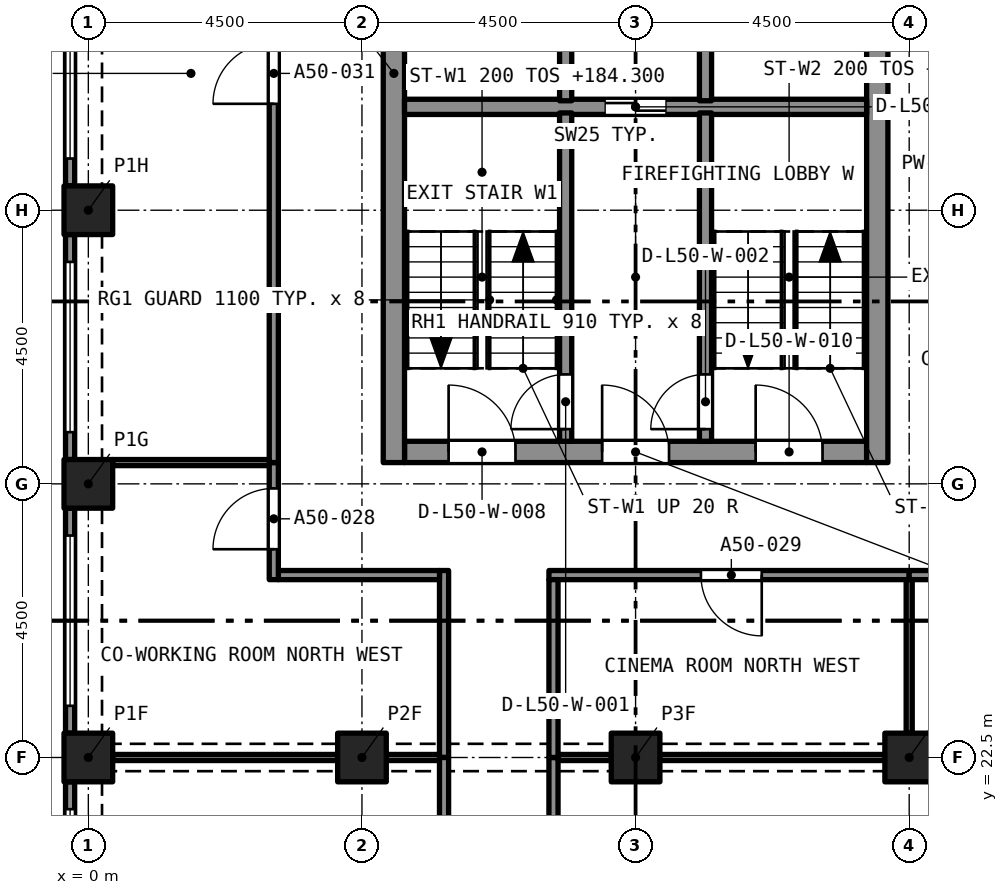
"""IFC4 building model, lengths in metres.
Left out: names, types, materials, properties, quantities, classifications, styles, units other than length and angle.
Written with IfcOpenShell. Run it as: python <this file> out.ifc"""

import sys

from ifc_helpers import new_model, si_unit, direction, frame, frame_2d, origin, origin_2d, place, context, subcontext, project, spatial, rectangle, extrude, element, fill, save


model = new_model("IFC4")
c1 = context("Model", 3, precision=1e-05, world=origin(), true_north=direction((0.0, 1.0)))
c2 = subcontext(c1, "Body", "Model", "MODEL_VIEW")
j1 = project(units=[si_unit("LENGTHUNIT", "METRE"), si_unit("PLANEANGLEUNIT", "RADIAN")], contexts=[c1])
p1 = place(None, origin())
s1 = spatial("IfcSite", under=j1, at=p1, CompositionType="ELEMENT")
p2 = place(p1, origin())
s2 = spatial("IfcBuilding", under=s1, at=p2, CompositionType="ELEMENT")
p3 = place(p2, frame((0.0, 0.0, 182.7)))
s3 = spatial("IfcBuildingStorey", under=s2, at=p3, CompositionType="ELEMENT", Elevation=182.7)
for number, where, z_axis, x_axis in (
    (1, (0.0, 22.5, 0.0), (0.0, 0.0, 1.0), (1.0, 0.0, 0.0)),
    (2, (4.5, 22.5, 0.0), (0.0, 0.0, 1.0), (1.0, 0.0, 0.0)),
    (3, (9.0, 22.5, 0.0), (0.0, 0.0, 1.0), (1.0, 0.0, 0.0)),
    (4, (13.5, 22.5, 0.0), (0.0, 0.0, 1.0), (1.0, 0.0, 0.0)),
    (5, (0.0, 27.0, 0.0), (0.0, 0.0, 1.0), (1.0, 0.0, 0.0)),
    (6, (0.0, 31.5, 0.0), (0.0, 0.0, 1.0), (1.0, 0.0, 0.0)),
):
    element("IfcColumn", number, at=place(p3, frame(where, z_axis=z_axis, x_axis=x_axis)), inside=s3, PredefinedType="COLUMN", context=c2, shape_type="SweptSolid", body=[
        extrude(rectangle(XDim=0.8, YDim=0.8, at=origin_2d()), origin(), (0.0, 0.0, 1.0), 3.2),
    ])
p4 = place(p3, frame((5.2, 27.525, 0.0), z_axis=(0.0, 0.0, 1.0), x_axis=(1.0, 0.0, 0.0)))
e7 = element("IfcWall", 7, at=p4, inside=s3, PredefinedType="SOLIDWALL", context=c2, shape_type="SweptSolid", body=[
    extrude(rectangle(XDim=7.6, YDim=0.35, at=frame_2d((3.8, 0.0))), origin(), (0.0, 0.0, 1.0), 3.2),
])
p5 = place(p4, frame((0.725, 0.0, 0.0)))
e8 = element("IfcOpeningElement", 8, at=p5, cuts=e7, PredefinedType="OPENING", context=c2, shape_type="SweptSolid", body=[
    extrude(rectangle(XDim=1.1, YDim=2.1, at=frame_2d((0.55, 1.05))), frame((0.0, 0.185, 0.0), z_axis=(0.0, -1.0, 0.0), x_axis=(1.0, 0.0, 0.0)), (0.0, 0.0, 1.0), 0.37),
])
p6 = place(p4, frame((3.25, 0.0, 0.0)))
e9 = element("IfcOpeningElement", 9, at=p6, cuts=e7, PredefinedType="OPENING", context=c2, shape_type="SweptSolid", body=[
    extrude(rectangle(XDim=1.1, YDim=2.1, at=frame_2d((0.55, 1.05))), frame((0.0, 0.185, 0.0), z_axis=(0.0, -1.0, 0.0), x_axis=(1.0, 0.0, 0.0)), (0.0, 0.0, 1.0), 0.37),
])
p7 = place(p4, frame((5.775, 0.0, 0.0)))
e10 = element("IfcOpeningElement", 10, at=p7, cuts=e7, PredefinedType="OPENING", context=c2, shape_type="SweptSolid", body=[
    extrude(rectangle(XDim=1.1, YDim=2.1, at=frame_2d((0.55, 1.05))), frame((0.0, 0.185, 0.0), z_axis=(0.0, -1.0, 0.0), x_axis=(1.0, 0.0, 0.0)), (0.0, 0.0, 1.0), 0.37),
])
p8 = place(p3, frame((5.025, 27.35, 0.0), z_axis=(0.0, 0.0, 1.0), x_axis=(0.0, 1.0, 0.0)))
e11 = element("IfcWall", 11, at=p8, inside=s3, PredefinedType="SOLIDWALL", context=c2, shape_type="SweptSolid", body=[
    extrude(rectangle(XDim=12.8, YDim=0.35, at=frame_2d((6.4, 0.0))), origin(), (0.0, 0.0, 1.0), 3.2),
])
p9 = place(p8, frame((8.6, 0.0, 0.0)))
e12 = element("IfcOpeningElement", 12, at=p9, cuts=e11, PredefinedType="OPENING", context=c2, shape_type="SweptSolid", body=[
    extrude(rectangle(XDim=1.2, YDim=2.1, at=frame_2d((0.6, 1.05))), frame((0.0, 0.185, 0.0), z_axis=(0.0, -1.0, 0.0), x_axis=(1.0, 0.0, 0.0)), (0.0, 0.0, 1.0), 0.37),
])
p10 = place(p3, frame((12.975, 27.35, 0.0), z_axis=(0.0, 0.0, 1.0), x_axis=(0.0, 1.0, 0.0)))
e13 = element("IfcWall", 13, at=p10, inside=s3, PredefinedType="SOLIDWALL", context=c2, shape_type="SweptSolid", body=[
    extrude(rectangle(XDim=12.8, YDim=0.35, at=frame_2d((6.4, 0.0))), origin(), (0.0, 0.0, 1.0), 3.2),
])
p11 = place(p10, frame((10.75, 0.0, 0.0)))
e14 = element("IfcOpeningElement", 14, at=p11, cuts=e13, PredefinedType="OPENING", context=c2, shape_type="SweptSolid", body=[
    extrude(rectangle(XDim=1.1, YDim=2.1, at=frame_2d((0.55, 1.05))), frame((0.0, 0.185, 0.0), z_axis=(0.0, -1.0, 0.0), x_axis=(1.0, 0.0, 0.0)), (0.0, 0.0, 1.0), 0.37),
])
p12 = place(p10, frame((8.6, 0.0, 0.0)))
e15 = element("IfcOpeningElement", 15, at=p12, cuts=e13, PredefinedType="OPENING", context=c2, shape_type="SweptSolid", body=[
    extrude(rectangle(XDim=1.2, YDim=2.1, at=frame_2d((0.6, 1.05))), frame((0.0, 0.185, 0.0), z_axis=(0.0, -1.0, 0.0), x_axis=(1.0, 0.0, 0.0)), (0.0, 0.0, 1.0), 0.37),
])
p13 = place(p3, frame((-0.3, 31.9, 0.0), z_axis=(0.0, 0.0, 1.0), x_axis=(0.0, 1.0, 0.0)))
e16 = element("IfcWall", 16, at=p13, inside=s3, PredefinedType="SOLIDWALL", context=c2, shape_type="SweptSolid", body=[
    extrude(rectangle(XDim=3.7, YDim=0.15, at=frame_2d((1.85, 0.0))), origin(), (0.0, 0.0, 1.0), 3.2),
])
p14 = place(p13, frame((0.45, 0.0, 0.45)))
e17 = element("IfcOpeningElement", 17, at=p14, cuts=e16, PredefinedType="OPENING", context=c2, shape_type="SweptSolid", body=[
    extrude(rectangle(XDim=2.8, YDim=1.95, at=frame_2d((1.4, 0.975))), frame((0.0, 0.085, 0.0), z_axis=(0.0, -1.0, 0.0), x_axis=(1.0, 0.0, 0.0)), (0.0, 0.0, 1.0), 0.17),
])
p15 = place(p3, frame((-0.3, 27.4, 0.0), z_axis=(0.0, 0.0, 1.0), x_axis=(0.0, 1.0, 0.0)))
e18 = element("IfcWall", 18, at=p15, inside=s3, PredefinedType="SOLIDWALL", context=c2, shape_type="SweptSolid", body=[
    extrude(rectangle(XDim=3.7, YDim=0.15, at=frame_2d((1.85, 0.0))), origin(), (0.0, 0.0, 1.0), 3.2),
])
p16 = place(p15, frame((0.45, 0.0, 0.45)))
e19 = element("IfcOpeningElement", 19, at=p16, cuts=e18, PredefinedType="OPENING", context=c2, shape_type="SweptSolid", body=[
    extrude(rectangle(XDim=2.8, YDim=1.95, at=frame_2d((1.4, 0.975))), frame((0.0, 0.085, 0.0), z_axis=(0.0, -1.0, 0.0), x_axis=(1.0, 0.0, 0.0)), (0.0, 0.0, 1.0), 0.17),
])
p17 = place(p3, frame((-0.3, 22.9, 0.0), z_axis=(0.0, 0.0, 1.0), x_axis=(0.0, 1.0, 0.0)))
e20 = element("IfcWall", 20, at=p17, inside=s3, PredefinedType="SOLIDWALL", context=c2, shape_type="SweptSolid", body=[
    extrude(rectangle(XDim=3.7, YDim=0.15, at=frame_2d((1.85, 0.0))), origin(), (0.0, 0.0, 1.0), 3.2),
])
p18 = place(p17, frame((0.45, 0.0, 0.45)))
e21 = element("IfcOpeningElement", 21, at=p18, cuts=e20, PredefinedType="OPENING", context=c2, shape_type="SweptSolid", body=[
    extrude(rectangle(XDim=2.8, YDim=1.95, at=frame_2d((1.4, 0.975))), frame((0.0, 0.085, 0.0), z_axis=(0.0, -1.0, 0.0), x_axis=(1.0, 0.0, 0.0)), (0.0, 0.0, 1.0), 0.17),
])
p19 = place(p3, frame((-0.3, 18.4, 0.0), z_axis=(0.0, 0.0, 1.0), x_axis=(0.0, 1.0, 0.0)))
e22 = element("IfcWall", 22, at=p19, inside=s3, PredefinedType="SOLIDWALL", context=c2, shape_type="SweptSolid", body=[
    extrude(rectangle(XDim=3.7, YDim=0.15, at=frame_2d((1.85, 0.0))), origin(), (0.0, 0.0, 1.0), 3.2),
])
p20 = place(p19, frame((0.45, 0.0, 0.45)))
e23 = element("IfcOpeningElement", 23, at=p20, cuts=e22, PredefinedType="OPENING", context=c2, shape_type="SweptSolid", body=[
    extrude(rectangle(XDim=2.8, YDim=1.95, at=frame_2d((1.4, 0.975))), frame((0.0, 0.085, 0.0), z_axis=(0.0, -1.0, 0.0), x_axis=(1.0, 0.0, 0.0)), (0.0, 0.0, 1.0), 0.17),
])
p21 = place(p3, frame((7.65, 22.5, 0.0), z_axis=(0.0, 0.0, 1.0), x_axis=(0.0, -1.0, 0.0)))
e24 = element("IfcWall", 24, at=p21, inside=s3, PredefinedType="PARTITIONING", context=c2, shape_type="SweptSolid", body=[
    extrude(rectangle(XDim=5.2, YDim=0.15, at=frame_2d((2.6, 0.0))), origin(), (0.0, 0.0, 1.0), 2.9),
])
p22 = place(p21, frame((2.1, 0.0, 0.0)))
e25 = element("IfcOpeningElement", 25, at=p22, cuts=e24, PredefinedType="OPENING", context=c2, shape_type="SweptSolid", body=[
    extrude(rectangle(XDim=1.0, YDim=2.1, at=frame_2d((0.5, 1.05))), frame((0.0, 0.085, 0.0), z_axis=(0.0, -1.0, 0.0), x_axis=(1.0, 0.0, 0.0)), (0.0, 0.0, 1.0), 0.17),
])
p23 = place(p3, frame((7.725, 22.5, 0.0), z_axis=(0.0, 0.0, 1.0), x_axis=(1.0, 0.0, 0.0)))
e26 = element("IfcWall", 26, at=p23, inside=s3, PredefinedType="PARTITIONING", context=c2, shape_type="SweptSolid", body=[
    extrude(rectangle(XDim=0.875, YDim=0.1, at=frame_2d((0.438, 0.0))), origin(), (0.0, 0.0, 1.0), 2.38),
])
p24 = place(p3, frame((9.4, 22.5, 0.0), z_axis=(0.0, 0.0, 1.0), x_axis=(1.0, 0.0, 0.0)))
e27 = element("IfcWall", 27, at=p24, inside=s3, PredefinedType="PARTITIONING", context=c2, shape_type="SweptSolid", body=[
    extrude(rectangle(XDim=3.7, YDim=0.1, at=frame_2d((1.85, 0.0))), origin(), (0.0, 0.0, 1.0), 2.38),
])
p25 = place(p3, frame((5.85, 22.5, 0.0), z_axis=(0.0, 0.0, 1.0), x_axis=(0.0, 1.0, 0.0)))
e28 = element("IfcWall", 28, at=p25, inside=s3, PredefinedType="PARTITIONING", context=c2, shape_type="SweptSolid", body=[
    extrude(rectangle(XDim=3.075, YDim=0.15, at=frame_2d((1.538, 0.0))), origin(), (0.0, 0.0, 1.0), 2.9),
])
p26 = place(p3, frame((3.125, 25.5, 0.0), z_axis=(0.0, 0.0, 1.0), x_axis=(1.0, 0.0, 0.0)))
e29 = element("IfcWall", 29, at=p26, inside=s3, PredefinedType="PARTITIONING", context=c2, shape_type="SweptSolid", body=[
    extrude(rectangle(XDim=2.65, YDim=0.15, at=frame_2d((1.325, 0.0))), origin(), (0.0, 0.0, 1.0), 2.9),
])
p27 = place(p3, frame((3.05, 25.425, 0.0), z_axis=(0.0, 0.0, 1.0), x_axis=(0.0, 1.0, 0.0)))
e30 = element("IfcWall", 30, at=p27, inside=s3, PredefinedType="PARTITIONING", context=c2, shape_type="SweptSolid", body=[
    extrude(rectangle(XDim=1.925, YDim=0.15, at=frame_2d((0.962, 0.0))), origin(), (0.0, 0.0, 1.0), 2.9),
])
p28 = place(p27, frame((0.5, 0.0, 0.0)))
e31 = element("IfcOpeningElement", 31, at=p28, cuts=e30, PredefinedType="OPENING", context=c2, shape_type="SweptSolid", body=[
    extrude(rectangle(XDim=1.0, YDim=2.1, at=frame_2d((0.5, 1.05))), frame((0.0, 0.085, 0.0), z_axis=(0.0, -1.0, 0.0), x_axis=(1.0, 0.0, 0.0)), (0.0, 0.0, 1.0), 0.17),
])
p29 = place(p3, frame((13.5, 25.5, 0.0), z_axis=(0.0, 0.0, 1.0), x_axis=(-1.0, 0.0, 0.0)))
e32 = element("IfcWall", 32, at=p29, inside=s3, PredefinedType="PARTITIONING", context=c2, shape_type="SweptSolid", body=[
    extrude(rectangle(XDim=5.925, YDim=0.15, at=frame_2d((2.962, 0.0))), origin(), (0.0, 0.0, 1.0), 2.9),
])
p30 = place(p29, frame((2.425, 0.0, 0.0)))
e33 = element("IfcOpeningElement", 33, at=p30, cuts=e32, PredefinedType="OPENING", context=c2, shape_type="SweptSolid", body=[
    extrude(rectangle(XDim=1.0, YDim=2.1, at=frame_2d((0.5, 1.05))), frame((0.0, 0.085, 0.0), z_axis=(0.0, -1.0, 0.0), x_axis=(1.0, 0.0, 0.0)), (0.0, 0.0, 1.0), 0.17),
])
p31 = place(p3, frame((7.65, 22.5, 0.0), z_axis=(0.0, 0.0, 1.0), x_axis=(0.0, 1.0, 0.0)))
e34 = element("IfcWall", 34, at=p31, inside=s3, PredefinedType="PARTITIONING", context=c2, shape_type="SweptSolid", body=[
    extrude(rectangle(XDim=2.925, YDim=0.15, at=frame_2d((1.462, 0.0))), origin(), (0.0, 0.0, 1.0), 2.9),
])
p32 = place(p3, frame((17.925, 25.5, 0.0), z_axis=(0.0, 0.0, 1.0), x_axis=(-1.0, 0.0, 0.0)))
e35 = element("IfcWall", 35, at=p32, inside=s3, PredefinedType="PARTITIONING", context=c2, shape_type="SweptSolid", body=[
    extrude(rectangle(XDim=4.425, YDim=0.15, at=frame_2d((2.212, 0.0))), origin(), (0.0, 0.0, 1.0), 2.9),
])
p33 = place(p32, frame((1.675, 0.0, 0.0)))
e36 = element("IfcOpeningElement", 36, at=p33, cuts=e35, PredefinedType="OPENING", context=c2, shape_type="SweptSolid", body=[
    extrude(rectangle(XDim=1.0, YDim=2.1, at=frame_2d((0.5, 1.05))), frame((0.0, 0.085, 0.0), z_axis=(0.0, -1.0, 0.0), x_axis=(1.0, 0.0, 0.0)), (0.0, 0.0, 1.0), 0.17),
])
p34 = place(p3, frame((3.05, 27.35, 0.0), z_axis=(0.0, 0.0, 1.0), x_axis=(0.0, 1.0, 0.0)))
e37 = element("IfcWall", 37, at=p34, inside=s3, PredefinedType="PARTITIONING", context=c2, shape_type="SweptSolid", body=[
    extrude(rectangle(XDim=12.675, YDim=0.15, at=frame_2d((6.337, 0.0))), origin(), (0.0, 0.0, 1.0), 2.9),
])
p35 = place(p34, frame((5.9, 0.0, 0.0)))
e38 = element("IfcOpeningElement", 38, at=p35, cuts=e37, PredefinedType="OPENING", context=c2, shape_type="SweptSolid", body=[
    extrude(rectangle(XDim=1.0, YDim=2.1, at=frame_2d((0.5, 1.05))), frame((0.0, 0.085, 0.0), z_axis=(0.0, -1.0, 0.0), x_axis=(1.0, 0.0, 0.0)), (0.0, 0.0, 1.0), 0.17),
])
p36 = place(p3, frame((5.85, 13.025, 0.0), z_axis=(0.0, 0.0, 1.0), x_axis=(0.0, 1.0, 0.0)))
e39 = element("IfcWall", 39, at=p36, inside=s3, PredefinedType="PARTITIONING", context=c2, shape_type="SweptSolid", body=[
    extrude(rectangle(XDim=9.475, YDim=0.15, at=frame_2d((4.738, 0.0))), origin(), (0.0, 0.0, 1.0), 2.9),
])
p37 = place(p36, frame((4.275, 0.0, 0.0)))
e40 = element("IfcOpeningElement", 40, at=p37, cuts=e39, PredefinedType="OPENING", context=c2, shape_type="SweptSolid", body=[
    extrude(rectangle(XDim=1.0, YDim=2.1, at=frame_2d((0.5, 1.05))), frame((0.0, 0.085, 0.0), z_axis=(0.0, -1.0, 0.0), x_axis=(1.0, 0.0, 0.0)), (0.0, 0.0, 1.0), 0.17),
])
p38 = place(p3, frame((0.4, 27.35, 0.0), z_axis=(0.0, 0.0, 1.0), x_axis=(1.0, 0.0, 0.0)))
e41 = element("IfcWall", 41, at=p38, inside=s3, PredefinedType="PARTITIONING", context=c2, shape_type="SweptSolid", body=[
    extrude(rectangle(XDim=2.575, YDim=0.1, at=frame_2d((1.288, 0.0))), origin(), (0.0, 0.0, 1.0), 2.9),
])
p39 = place(p3, frame((4.9, 22.5, 0.0), z_axis=(0.0, 0.0, 1.0), x_axis=(1.0, 0.0, 0.0)))
e42 = element("IfcWall", 42, at=p39, inside=s3, PredefinedType="PARTITIONING", context=c2, shape_type="SweptSolid", body=[
    extrude(rectangle(XDim=0.875, YDim=0.1, at=frame_2d((0.438, 0.0))), origin(), (0.0, 0.0, 1.0), 2.38),
])
p40 = place(p3, frame((0.4, 22.5, 0.0), z_axis=(0.0, 0.0, 1.0), x_axis=(1.0, 0.0, 0.0)))
e43 = element("IfcWall", 43, at=p40, inside=s3, PredefinedType="PARTITIONING", context=c2, shape_type="SweptSolid", body=[
    extrude(rectangle(XDim=3.7, YDim=0.1, at=frame_2d((1.85, 0.0))), origin(), (0.0, 0.0, 1.0), 2.38),
])
p41 = place(p3, frame((13.5, 22.9, 0.0), z_axis=(0.0, 0.0, 1.0), x_axis=(0.0, 1.0, 0.0)))
e44 = element("IfcWall", 44, at=p41, inside=s3, PredefinedType="PARTITIONING", context=c2, shape_type="SweptSolid", body=[
    extrude(rectangle(XDim=2.525, YDim=0.1, at=frame_2d((1.263, 0.0))), origin(), (0.0, 0.0, 1.0), 2.9),
])
p42 = place(p3, frame((5.2, 33.2, 0.0), z_axis=(0.0, 0.0, 1.0), x_axis=(1.0, 0.0, 0.0)))
e45 = element("IfcWall", 45, at=p42, inside=s3, PredefinedType="SOLIDWALL", context=c2, shape_type="SweptSolid", body=[
    extrude(rectangle(XDim=7.6, YDim=0.25, at=frame_2d((3.8, 0.0))), origin(), (0.0, 0.0, 1.0), 2.9),
])
p43 = place(p42, frame((3.3, 0.0, 0.0)))
e46 = element("IfcOpeningElement", 46, at=p43, cuts=e45, PredefinedType="OPENING", context=c2, shape_type="SweptSolid", body=[
    extrude(rectangle(XDim=1.0, YDim=2.1, at=frame_2d((0.5, 1.05))), frame((0.0, 0.135, 0.0), z_axis=(0.0, -1.0, 0.0), x_axis=(1.0, 0.0, 0.0)), (0.0, 0.0, 1.0), 0.27),
])
p44 = place(p3, frame((7.85, 27.7, 0.0), z_axis=(0.0, 0.0, 1.0), x_axis=(0.0, 1.0, 0.0)))
e47 = element("IfcWall", 47, at=p44, inside=s3, PredefinedType="SOLIDWALL", context=c2, shape_type="SweptSolid", body=[
    extrude(rectangle(XDim=5.4, YDim=0.2, at=frame_2d((2.7, 0.0))), origin(), (0.0, 0.0, 1.0), 2.9),
])
p45 = place(p44, frame((0.2, 0.0, 0.0)))
e48 = element("IfcOpeningElement", 48, at=p45, cuts=e47, PredefinedType="OPENING", context=c2, shape_type="SweptSolid", body=[
    extrude(rectangle(XDim=0.9, YDim=2.1, at=frame_2d((0.45, 1.05))), frame((0.0, 0.11, 0.0), z_axis=(0.0, -1.0, 0.0), x_axis=(1.0, 0.0, 0.0)), (0.0, 0.0, 1.0), 0.22),
])
p46 = place(p3, frame((10.15, 27.7, 0.0), z_axis=(0.0, 0.0, 1.0), x_axis=(0.0, 1.0, 0.0)))
e49 = element("IfcWall", 49, at=p46, inside=s3, PredefinedType="SOLIDWALL", context=c2, shape_type="SweptSolid", body=[
    extrude(rectangle(XDim=5.4, YDim=0.2, at=frame_2d((2.7, 0.0))), origin(), (0.0, 0.0, 1.0), 2.9),
])
p47 = place(p46, frame((0.2, 0.0, 0.0)))
e50 = element("IfcOpeningElement", 50, at=p47, cuts=e49, PredefinedType="OPENING", context=c2, shape_type="SweptSolid", body=[
    extrude(rectangle(XDim=0.9, YDim=2.1, at=frame_2d((0.45, 1.05))), frame((0.0, 0.11, 0.0), z_axis=(0.0, -1.0, 0.0), x_axis=(1.0, 0.0, 0.0)), (0.0, 0.0, 1.0), 0.22),
])
for number, where, z_axis, x_axis in (
    (51, (7.85, 33.3, 0.0), (0.0, 0.0, 1.0), (0.0, 1.0, 0.0)),
    (52, (10.15, 33.3, 0.0), (0.0, 0.0, 1.0), (0.0, 1.0, 0.0)),
):
    element("IfcWall", number, at=place(p3, frame(where, z_axis=z_axis, x_axis=x_axis)), inside=s3, PredefinedType="SOLIDWALL", context=c2, shape_type="SweptSolid", body=[
        extrude(rectangle(XDim=2.3, YDim=0.2, at=frame_2d((1.15, 0.0))), origin(), (0.0, 0.0, 1.0), 2.9),
    ])
p48 = place(p14, origin())
e53 = element("IfcWindow", 53, at=p48, inside=s3, PartitioningType="SINGLE_PANEL", PredefinedType="WINDOW", context=c2, shape_type="SweptSolid", body=[
    extrude(rectangle(XDim=2.8, YDim=1.95, at=frame_2d((1.4, 0.975))), frame((0.0, 0.03, 0.0), z_axis=(0.0, -1.0, 0.0), x_axis=(1.0, 0.0, 0.0)), (0.0, 0.0, 1.0), 0.06),
])
fill(e17, e53)
p49 = place(p16, origin())
e54 = element("IfcWindow", 54, at=p49, inside=s3, PartitioningType="SINGLE_PANEL", PredefinedType="WINDOW", context=c2, shape_type="SweptSolid", body=[
    extrude(rectangle(XDim=2.8, YDim=1.95, at=frame_2d((1.4, 0.975))), frame((0.0, 0.03, 0.0), z_axis=(0.0, -1.0, 0.0), x_axis=(1.0, 0.0, 0.0)), (0.0, 0.0, 1.0), 0.06),
])
fill(e19, e54)
p50 = place(p18, origin())
e55 = element("IfcWindow", 55, at=p50, inside=s3, PartitioningType="SINGLE_PANEL", PredefinedType="WINDOW", context=c2, shape_type="SweptSolid", body=[
    extrude(rectangle(XDim=2.8, YDim=1.95, at=frame_2d((1.4, 0.975))), frame((0.0, 0.03, 0.0), z_axis=(0.0, -1.0, 0.0), x_axis=(1.0, 0.0, 0.0)), (0.0, 0.0, 1.0), 0.06),
])
fill(e21, e55)
p51 = place(p20, origin())
e56 = element("IfcWindow", 56, at=p51, inside=s3, PartitioningType="SINGLE_PANEL", PredefinedType="WINDOW", context=c2, shape_type="SweptSolid", body=[
    extrude(rectangle(XDim=2.8, YDim=1.95, at=frame_2d((1.4, 0.975))), frame((0.0, 0.03, 0.0), z_axis=(0.0, -1.0, 0.0), x_axis=(1.0, 0.0, 0.0)), (0.0, 0.0, 1.0), 0.06),
])
fill(e23, e56)
p52 = place(p28, origin())
e57 = element("IfcDoor", 57, at=p52, inside=s3, OperationType="SINGLE_SWING_RIGHT", PredefinedType="DOOR", context=c2, shape_type="SweptSolid", body=[
    extrude(rectangle(XDim=1.0, YDim=2.1, at=frame_2d((0.5, 1.05))), frame((0.0, 0.025, 0.0), z_axis=(0.0, -1.0, 0.0), x_axis=(1.0, 0.0, 0.0)), (0.0, 0.0, 1.0), 0.05),
])
fill(e31, e57)
p53 = place(p30, origin())
e58 = element("IfcDoor", 58, at=p53, inside=s3, OperationType="SINGLE_SWING_LEFT", PredefinedType="DOOR", context=c2, shape_type="SweptSolid", body=[
    extrude(rectangle(XDim=1.0, YDim=2.1, at=frame_2d((0.5, 1.05))), frame((0.0, 0.025, 0.0), z_axis=(0.0, -1.0, 0.0), x_axis=(1.0, 0.0, 0.0)), (0.0, 0.0, 1.0), 0.05),
])
fill(e33, e58)
p54 = place(p35, origin())
e59 = element("IfcDoor", 59, at=p54, inside=s3, OperationType="SINGLE_SWING_RIGHT", PredefinedType="DOOR", context=c2, shape_type="SweptSolid", body=[
    extrude(rectangle(XDim=1.0, YDim=2.1, at=frame_2d((0.5, 1.05))), frame((0.0, 0.025, 0.0), z_axis=(0.0, -1.0, 0.0), x_axis=(1.0, 0.0, 0.0)), (0.0, 0.0, 1.0), 0.05),
])
fill(e38, e59)
p55 = place(p45, origin())
e60 = element("IfcDoor", 60, at=p55, inside=s3, OperationType="SINGLE_SWING_LEFT", PredefinedType="DOOR", context=c2, shape_type="SweptSolid", body=[
    extrude(rectangle(XDim=0.9, YDim=2.1, at=frame_2d((0.45, 1.05))), frame((0.0, 0.025, 0.0), z_axis=(0.0, -1.0, 0.0), x_axis=(1.0, 0.0, 0.0)), (0.0, 0.0, 1.0), 0.05),
])
fill(e48, e60)
p56 = place(p47, origin())
e61 = element("IfcDoor", 61, at=p56, inside=s3, OperationType="SINGLE_SWING_LEFT", PredefinedType="DOOR", context=c2, shape_type="SweptSolid", body=[
    extrude(rectangle(XDim=0.9, YDim=2.1, at=frame_2d((0.45, 1.05))), frame((0.0, 0.025, 0.0), z_axis=(0.0, -1.0, 0.0), x_axis=(1.0, 0.0, 0.0)), (0.0, 0.0, 1.0), 0.05),
])
fill(e50, e61)
p57 = place(p43, origin())
e62 = element("IfcDoor", 62, at=p57, inside=s3, OperationType="SLIDING_TO_LEFT", PredefinedType="DOOR", context=c2, shape_type="SweptSolid", body=[
    extrude(rectangle(XDim=1.0, YDim=2.1, at=frame_2d((0.5, 1.05))), frame((0.0, 0.025, 0.0), z_axis=(0.0, -1.0, 0.0), x_axis=(1.0, 0.0, 0.0)), (0.0, 0.0, 1.0), 0.05),
])
fill(e46, e62)
p58 = place(p5, origin())
e63 = element("IfcDoor", 63, at=p58, inside=s3, OperationType="SINGLE_SWING_LEFT", PredefinedType="DOOR", context=c2, shape_type="SweptSolid", body=[
    extrude(rectangle(XDim=1.1, YDim=2.1, at=frame_2d((0.55, 1.05))), frame((0.0, 0.025, 0.0), z_axis=(0.0, -1.0, 0.0), x_axis=(1.0, 0.0, 0.0)), (0.0, 0.0, 1.0), 0.05),
])
fill(e8, e63)
p59 = place(p6, origin())
e64 = element("IfcDoor", 64, at=p59, inside=s3, OperationType="SINGLE_SWING_LEFT", PredefinedType="DOOR", context=c2, shape_type="SweptSolid", body=[
    extrude(rectangle(XDim=1.1, YDim=2.1, at=frame_2d((0.55, 1.05))), frame((0.0, 0.025, 0.0), z_axis=(0.0, -1.0, 0.0), x_axis=(1.0, 0.0, 0.0)), (0.0, 0.0, 1.0), 0.05),
])
fill(e9, e64)
p60 = place(p7, origin())
e65 = element("IfcDoor", 65, at=p60, inside=s3, OperationType="SINGLE_SWING_LEFT", PredefinedType="DOOR", context=c2, shape_type="SweptSolid", body=[
    extrude(rectangle(XDim=1.1, YDim=2.1, at=frame_2d((0.55, 1.05))), frame((0.0, 0.025, 0.0), z_axis=(0.0, -1.0, 0.0), x_axis=(1.0, 0.0, 0.0)), (0.0, 0.0, 1.0), 0.05),
])
fill(e10, e65)
save(model, sys.argv[1])
